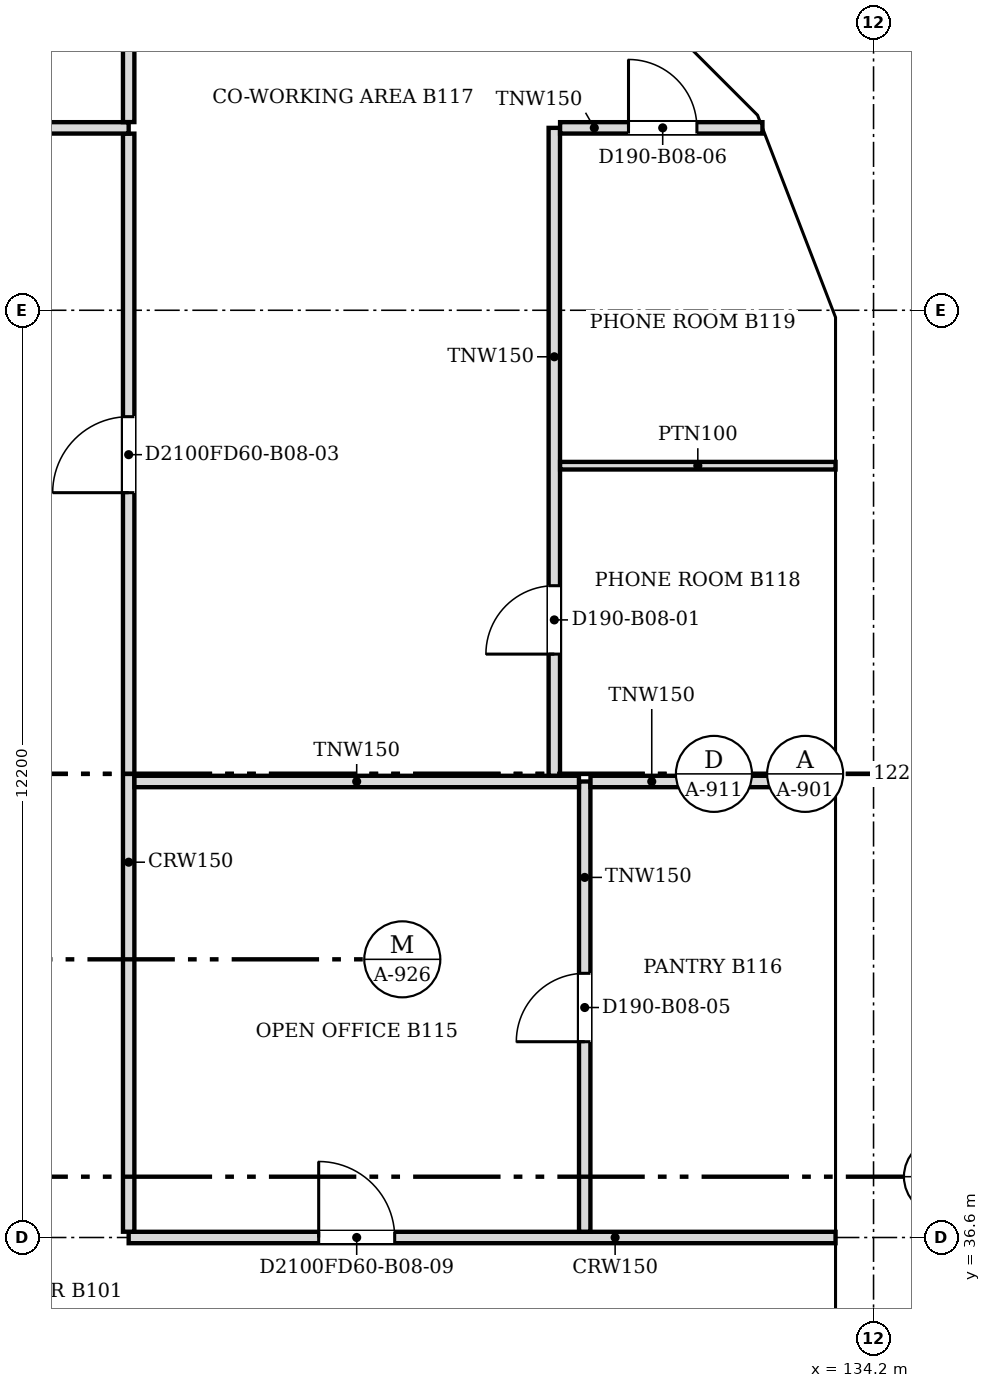
"""IFC4 building model, lengths in metres.
Left out: names, types, materials, properties, quantities, classifications, styles, units other than length and angle.
Written with IfcOpenShell. Run it as: python <this file> out.ifc"""

import sys

from ifc_helpers import new_model, si_unit, direction, frame, frame_2d, origin, place, context, subcontext, project, spatial, polyline, rectangle, outline, extrude, faceted_brep, source, transform, mapped, element, fill, save


model = new_model("IFC4")
c1 = context("Model", 3, precision=1e-05, world=origin(), true_north=direction((0.0, 1.0)))
c2 = subcontext(c1, "Body", "Model", "MODEL_VIEW")
j1 = project(units=[si_unit("LENGTHUNIT", "METRE"), si_unit("PLANEANGLEUNIT", "RADIAN")], contexts=[c1])
p1 = place(None, origin())
s1 = spatial("IfcSite", under=j1, at=p1, CompositionType="ELEMENT")
p2 = place(p1, origin())
s2 = spatial("IfcBuilding", under=s1, at=p2, CompositionType="ELEMENT")
p3 = place(p2, frame((0.0, 0.0, 80.0)))
s3 = spatial("IfcBuildingStorey", under=s2, at=p3, CompositionType="ELEMENT", Elevation=80.0)
m1 = source(origin(), c2, "Body", "Brep", [
    faceted_brep([(3.05, -0.25, 0.0), (6.1, -0.25, 3.8), (6.1, -0.25, 3.8), (3.05, -0.25, 7.6), (0.0, -0.25, 3.8), (0.0, 0.25, 3.8), (3.05, 0.25, 7.6), (6.1, 0.25, 3.8), (6.1, 0.25, 3.8), (3.05, 0.25, 0.0)], [[[0, 1, 2, 3, 4]], [[5, 6, 7, 8, 9]], [[9, 8, 1, 0]], [[7, 6, 3, 2]], [[6, 5, 4, 3]], [[5, 9, 0, 4]], [[1, 8, 7, 2]]]),
])
p4 = place(p3, frame((133.95, 33.55, -3.8), z_axis=(0.0, 0.0, 1.0), x_axis=(0.0, 1.0, 0.0)))
e1 = element("IfcWall", 1, at=p4, inside=s3, PredefinedType="SOLIDWALL", context=c2, shape_type="MappedRepresentation", body=[
    mapped(m1, transform((0.0, 0.0, 0.0), scale=1.0)),
])
m2 = source(origin(), c2, "Body", "SweptSolid", [
    extrude(outline(polyline([(3.05, 0.399), (5.78, 3.8), (3.05, 7.201), (0.321, 3.8), (3.05, 0.399)])), frame((0.0, 0.26, 0.0), z_axis=(0.0, -1.0, 0.0), x_axis=(1.0, 0.0, 0.0)), (0.0, 0.0, 1.0), 0.52),
])
p5 = place(p4, origin())
e2 = element("IfcOpeningElement", 2, at=p5, cuts=e1, PredefinedType="OPENING", context=c2, shape_type="MappedRepresentation", body=[
    mapped(m2, transform((0.0, 0.0, 0.0), scale=1.0)),
])
m3 = source(origin(), c2, "Body", "SweptSolid", [
    extrude(outline(polyline([(3.05, 0.0), (6.1, 3.8), (3.05, 7.6), (0.0, 3.8), (3.05, 0.0)])), frame((0.0, 0.25, 0.0), z_axis=(0.0, -1.0, 0.0), x_axis=(1.0, 0.0, 0.0)), (0.0, 0.0, 1.0), 0.5),
])
p6 = place(p3, frame((133.95, 39.65, -3.8), z_axis=(0.0, 0.0, 1.0), x_axis=(0.0, 1.0, 0.0)))
e3 = element("IfcWall", 3, at=p6, inside=s3, PredefinedType="SOLIDWALL", context=c2, shape_type="MappedRepresentation", body=[
    mapped(m3, transform((0.0, 0.0, 0.0), scale=1.0)),
])
p7 = place(p6, origin())
e4 = element("IfcOpeningElement", 4, at=p7, cuts=e3, PredefinedType="OPENING", context=c2, shape_type="MappedRepresentation", body=[
    mapped(m2, transform((0.0, 0.0, 0.0), scale=1.0)),
])
m4 = source(origin(), c2, "Body", "Brep", [
    faceted_brep([(3.003, -0.25, 0.0), (3.05, -0.25, 0.06), (3.05, -0.25, 7.54), (3.003, -0.25, 7.6), (0.0, -0.25, 3.8), (0.0, 0.25, 3.8), (2.957, 0.25, 7.541), (2.957, 0.25, 0.059), (3.003, 0.0, 0.0), (3.003, 0.0, 7.6)], [[[0, 1, 2, 3, 4]], [[5, 6, 7]], [[1, 0, 8]], [[9, 3, 2]], [[6, 5, 4, 3, 9]], [[5, 7, 8, 0, 4]], [[1, 8, 7, 6, 9, 2]]]),
])
p8 = place(p3, frame((133.95, 45.75, -3.8), z_axis=(0.0, 0.0, 1.0), x_axis=(0.0, 1.0, 0.0)))
e5 = element("IfcWall", 5, at=p8, inside=s3, PredefinedType="SOLIDWALL", context=c2, shape_type="MappedRepresentation", body=[
    mapped(m4, transform((0.0, 0.0, 0.0), scale=1.0)),
])
m5 = source(origin(), c2, "Body", "SweptSolid", [
    extrude(outline(polyline([(2.803, 6.944), (0.319, 3.8), (2.803, 0.656), (2.803, 6.944)])), frame((0.0, 0.26, 0.0), z_axis=(0.0, -1.0, 0.0), x_axis=(1.0, 0.0, 0.0)), (0.0, 0.0, 1.0), 0.52),
])
p9 = place(p8, origin())
e6 = element("IfcOpeningElement", 6, at=p9, cuts=e5, PredefinedType="OPENING", context=c2, shape_type="MappedRepresentation", body=[
    mapped(m5, transform((0.0, 0.0, 0.0), scale=1.0)),
])
m6 = source(origin(), c2, "Body", "Brep", [
    faceted_brep([(0.047, -0.25, 0.0), (2.997, -0.25, 3.8), (0.047, -0.25, 7.6), (0.0, -0.25, 7.541), (0.0, -0.25, 0.059), (0.093, 0.25, 7.54), (2.944, 0.25, 3.868), (2.944, 0.25, 3.732), (0.093, 0.25, 0.06), (2.997, 0.0, 3.8), (0.047, 0.0, 0.0), (0.047, 0.0, 7.6)], [[[0, 1, 2, 3, 4]], [[5, 6, 7, 8]], [[8, 7, 9, 1, 0, 10]], [[6, 5, 11, 2, 1, 9]], [[3, 2, 11]], [[10, 0, 4]], [[8, 10, 4, 3, 11, 5]], [[9, 7, 6]]]),
])
p10 = place(p3, frame((133.967, 48.71, -3.8), z_axis=(0.0, 0.0, 1.0), x_axis=(-0.359901446078, 0.932990326376, 0.0)))
e7 = element("IfcWall", 7, at=p10, inside=s3, PredefinedType="SOLIDWALL", context=c2, shape_type="MappedRepresentation", body=[
    mapped(m6, transform((0.0, 0.0, 0.0), scale=1.0)),
])
m7 = source(origin(), c2, "Body", "SweptSolid", [
    extrude(outline(polyline([(0.247, 0.665), (2.681, 3.8), (0.247, 6.935), (0.247, 0.665)])), frame((0.0, 0.26, 0.0), z_axis=(0.0, -1.0, 0.0), x_axis=(1.0, 0.0, 0.0)), (0.0, 0.0, 1.0), 0.52),
])
p11 = place(p10, origin())
e8 = element("IfcOpeningElement", 8, at=p11, cuts=e7, PredefinedType="OPENING", context=c2, shape_type="MappedRepresentation", body=[
    mapped(m7, transform((0.0, 0.0, 0.0), scale=1.0)),
])
m8 = source(origin(), c2, "Body", "Brep", [
    faceted_brep([(2.944, -0.25, 0.0), (2.997, -0.25, 0.068), (2.997, -0.25, 7.532), (2.944, -0.25, 7.6), (0.0, -0.25, 3.8), (0.053, 0.25, 3.868), (2.891, 0.25, 7.532), (2.891, 0.25, 0.068), (0.053, 0.25, 3.732), (2.944, 0.0, 0.0), (2.944, 0.0, 7.6), (0.0, 0.0, 3.8)], [[[0, 1, 2, 3, 4]], [[5, 6, 7, 8]], [[1, 0, 9]], [[10, 3, 2]], [[6, 5, 11, 4, 3, 10]], [[8, 7, 9, 0, 4, 11]], [[8, 11, 5]], [[1, 9, 7, 6, 10, 2]]]),
])
p12 = place(p3, frame((132.888, 51.506, -3.8), z_axis=(0.0, 0.0, 1.0), x_axis=(-0.707147509625, 0.707066050402, 0.0)))
e9 = element("IfcWall", 9, at=p12, inside=s3, PredefinedType="SOLIDWALL", context=c2, shape_type="MappedRepresentation", body=[
    mapped(m8, transform((0.0, 0.0, 0.0), scale=1.0)),
])
m9 = source(origin(), c2, "Body", "SweptSolid", [
    extrude(outline(polyline([(2.744, 6.934), (0.316, 3.8), (2.744, 0.666), (2.744, 6.934)])), frame((0.0, 0.26, 0.0), z_axis=(0.0, -1.0, 0.0), x_axis=(1.0, 0.0, 0.0)), (0.0, 0.0, 1.0), 0.52),
])
p13 = place(p12, origin())
e10 = element("IfcOpeningElement", 10, at=p13, cuts=e9, PredefinedType="OPENING", context=c2, shape_type="MappedRepresentation", body=[
    mapped(m9, transform((0.0, 0.0, 0.0), scale=1.0)),
])
p14 = place(p2, frame((0.0, 0.0, 83.8)))
s4 = spatial("IfcBuildingStorey", under=s2, at=p14, CompositionType="ELEMENT", Elevation=83.8)
p15 = place(p14, frame((133.95, 30.5, -3.8), z_axis=(0.0, 0.0, 1.0), x_axis=(0.0, 1.0, 0.0)))
e11 = element("IfcWall", 11, at=p15, inside=s4, PredefinedType="SOLIDWALL", context=c2, shape_type="MappedRepresentation", body=[
    mapped(m3, transform((0.0, 0.0, 0.0), scale=1.0)),
])
p16 = place(p15, origin())
e12 = element("IfcOpeningElement", 12, at=p16, cuts=e11, PredefinedType="OPENING", context=c2, shape_type="MappedRepresentation", body=[
    mapped(m2, transform((0.0, 0.0, 0.0), scale=1.0)),
])
p17 = place(p14, frame((133.95, 36.6, -3.8), z_axis=(0.0, 0.0, 1.0), x_axis=(0.0, 1.0, 0.0)))
e13 = element("IfcWall", 13, at=p17, inside=s4, PredefinedType="SOLIDWALL", context=c2, shape_type="MappedRepresentation", body=[
    mapped(m1, transform((0.0, 0.0, 0.0), scale=1.0)),
])
p18 = place(p17, origin())
e14 = element("IfcOpeningElement", 14, at=p18, cuts=e13, PredefinedType="OPENING", context=c2, shape_type="MappedRepresentation", body=[
    mapped(m2, transform((0.0, 0.0, 0.0), scale=1.0)),
])
m10 = source(origin(), c2, "Body", "Brep", [
    faceted_brep([(3.05, -0.25, 0.0), (6.053, -0.25, 3.8), (3.05, -0.25, 7.6), (0.0, -0.25, 3.8), (0.0, 0.25, 3.8), (3.05, 0.25, 7.6), (6.007, 0.25, 3.859), (6.007, 0.25, 3.741), (3.05, 0.25, 0.0), (6.053, 0.0, 3.8)], [[[0, 1, 2, 3]], [[4, 5, 6, 7, 8]], [[8, 7, 9, 1, 0]], [[6, 5, 2, 1, 9]], [[5, 4, 3, 2]], [[4, 8, 0, 3]], [[9, 7, 6]]]),
])
p19 = place(p14, frame((133.95, 42.7, -3.8), z_axis=(0.0, 0.0, 1.0), x_axis=(0.0, 1.0, 0.0)))
e15 = element("IfcWall", 15, at=p19, inside=s4, PredefinedType="SOLIDWALL", context=c2, shape_type="MappedRepresentation", body=[
    mapped(m10, transform((0.0, 0.0, 0.0), scale=1.0)),
])
m11 = source(origin(), c2, "Body", "SweptSolid", [
    extrude(outline(polyline([(3.049, 0.401), (5.735, 3.8), (3.049, 7.199), (0.321, 3.8), (3.049, 0.401)])), frame((0.0, 0.26, 0.0), z_axis=(0.0, -1.0, 0.0), x_axis=(1.0, 0.0, 0.0)), (0.0, 0.0, 1.0), 0.52),
])
p20 = place(p19, origin())
e16 = element("IfcOpeningElement", 16, at=p20, cuts=e15, PredefinedType="OPENING", context=c2, shape_type="MappedRepresentation", body=[
    mapped(m11, transform((0.0, 0.0, 0.0), scale=1.0)),
])
m12 = source(origin(), c2, "Body", "Brep", [
    faceted_brep([(2.95, -0.25, 0.0), (3.003, -0.25, 0.068), (3.003, -0.25, 7.532), (2.95, -0.25, 7.6), (0.0, -0.25, 3.8), (0.047, 0.25, 3.86), (2.898, 0.25, 7.532), (2.898, 0.25, 0.068), (0.047, 0.25, 3.74), (2.95, 0.0, 0.0), (2.95, 0.0, 7.6), (0.0, 0.0, 3.8)], [[[0, 1, 2, 3, 4]], [[5, 6, 7, 8]], [[1, 0, 9]], [[10, 3, 2]], [[6, 5, 11, 4, 3, 10]], [[8, 7, 9, 0, 4, 11]], [[8, 11, 5]], [[1, 9, 7, 6, 10, 2]]]),
])
p21 = place(p14, frame((133.95, 48.753, -3.8), z_axis=(0.0, 0.0, 1.0), x_axis=(-0.359855894603, 0.933007896601, 0.0)))
e17 = element("IfcWall", 17, at=p21, inside=s4, PredefinedType="SOLIDWALL", context=c2, shape_type="MappedRepresentation", body=[
    mapped(m12, transform((0.0, 0.0, 0.0), scale=1.0)),
])
m13 = source(origin(), c2, "Body", "SweptSolid", [
    extrude(outline(polyline([(2.75, 6.935), (0.316, 3.8), (2.75, 0.665), (2.75, 6.935)])), frame((0.0, 0.26, 0.0), z_axis=(0.0, -1.0, 0.0), x_axis=(1.0, 0.0, 0.0)), (0.0, 0.0, 1.0), 0.52),
])
p22 = place(p21, origin())
e18 = element("IfcOpeningElement", 18, at=p22, cuts=e17, PredefinedType="OPENING", context=c2, shape_type="MappedRepresentation", body=[
    mapped(m13, transform((0.0, 0.0, 0.0), scale=1.0)),
])
m14 = source(origin(), c2, "Body", "Brep", [
    faceted_brep([(0.053, -0.25, 0.0), (2.997, -0.25, 3.8), (0.053, -0.25, 7.6), (0.0, -0.25, 7.532), (0.0, -0.25, 0.068), (0.106, 0.25, 7.532), (2.944, 0.25, 3.868), (2.944, 0.25, 3.732), (0.106, 0.25, 0.068), (2.997, 0.0, 3.8), (0.053, 0.0, 0.0), (0.053, 0.0, 7.6)], [[[0, 1, 2, 3, 4]], [[5, 6, 7, 8]], [[8, 7, 9, 1, 0, 10]], [[6, 5, 11, 2, 1, 9]], [[3, 2, 11]], [[10, 0, 4]], [[8, 10, 4, 3, 11, 5]], [[9, 7, 6]]]),
])
p23 = place(p14, frame((132.926, 51.469, -3.8), z_axis=(0.0, 0.0, 1.0), x_axis=(-0.707066050402, 0.707147509625, 0.0)))
e19 = element("IfcWall", 19, at=p23, inside=s4, PredefinedType="SOLIDWALL", context=c2, shape_type="MappedRepresentation", body=[
    mapped(m14, transform((0.0, 0.0, 0.0), scale=1.0)),
])
m15 = source(origin(), c2, "Body", "SweptSolid", [
    extrude(outline(polyline([(0.253, 0.666), (2.681, 3.8), (0.253, 6.934), (0.253, 0.666)])), frame((0.0, 0.26, 0.0), z_axis=(0.0, -1.0, 0.0), x_axis=(1.0, 0.0, 0.0)), (0.0, 0.0, 1.0), 0.52),
])
p24 = place(p23, origin())
e20 = element("IfcOpeningElement", 20, at=p24, cuts=e19, PredefinedType="OPENING", context=c2, shape_type="MappedRepresentation", body=[
    mapped(m15, transform((0.0, 0.0, 0.0), scale=1.0)),
])
p25 = place(p3, frame((124.4, 36.6, 0.0), z_axis=(0.0, 0.0, 1.0), x_axis=(1.0, 0.0, 0.0)))
e21 = element("IfcWall", 21, at=p25, inside=s3, PredefinedType="PARTITIONING", context=c2, shape_type="SweptSolid", body=[
    extrude(rectangle(XDim=9.3, YDim=0.15, at=frame_2d((4.65, 0.0))), origin(), (0.0, 0.0, 1.0), 3.067),
])
m16 = source(origin(), c2, "Body", "SweptSolid", [
    extrude(rectangle(XDim=1.0, YDim=2.1, at=frame_2d((0.5, 1.05))), frame((0.0, 0.085, 0.0), z_axis=(0.0, -1.0, 0.0), x_axis=(1.0, 0.0, 0.0)), (0.0, 0.0, 1.0), 0.17),
])
p26 = place(p25, frame((2.5, 0.0, 0.0)))
e22 = element("IfcOpeningElement", 22, at=p26, cuts=e21, PredefinedType="OPENING", context=c2, shape_type="MappedRepresentation", body=[
    mapped(m16, transform((0.0, 0.0, 0.0), scale=1.0)),
])
p27 = place(p3, frame((124.4, 51.124, 0.0), z_axis=(0.0, 0.0, 1.0), x_axis=(0.0, -1.0, 0.0)))
e23 = element("IfcWall", 23, at=p27, inside=s3, PredefinedType="PARTITIONING", context=c2, shape_type="SweptSolid", body=[
    extrude(rectangle(XDim=14.448, YDim=0.15, at=frame_2d((7.224, 0.0))), origin(), (0.0, 0.0, 1.0), 3.067),
])
p28 = place(p27, frame((3.724, 0.0, 0.0)))
e24 = element("IfcOpeningElement", 24, at=p28, cuts=e23, PredefinedType="OPENING", context=c2, shape_type="MappedRepresentation", body=[
    mapped(m16, transform((0.0, 0.0, 0.0), scale=1.0)),
])
p29 = place(p3, frame((130.4, 42.6, 0.0), z_axis=(0.0, 0.0, 1.0), x_axis=(0.0, -1.0, 0.0)))
e25 = element("IfcWall", 25, at=p29, inside=s3, PredefinedType="PARTITIONING", context=c2, shape_type="SweptSolid", body=[
    extrude(rectangle(XDim=5.924, YDim=0.15, at=frame_2d((2.962, 0.0))), origin(), (0.0, 0.0, 1.0), 3.067),
])
m17 = source(origin(), c2, "Body", "SweptSolid", [
    extrude(rectangle(XDim=0.9, YDim=2.1, at=frame_2d((0.45, 1.05))), frame((0.0, 0.085, 0.0), z_axis=(0.0, -1.0, 0.0), x_axis=(1.0, 0.0, 0.0)), (0.0, 0.0, 1.0), 0.17),
])
p30 = place(p29, frame((2.524, 0.0, 0.0)))
e26 = element("IfcOpeningElement", 26, at=p30, cuts=e25, PredefinedType="OPENING", context=c2, shape_type="MappedRepresentation", body=[
    mapped(m17, transform((0.0, 0.0, 0.0), scale=1.0)),
])
p31 = place(p3, frame((124.476, 42.6, 0.0), z_axis=(0.0, 0.0, 1.0), x_axis=(1.0, 0.0, 0.0)))
e27 = element("IfcWall", 27, at=p31, inside=s3, PredefinedType="PARTITIONING", context=c2, shape_type="SweptSolid", body=[
    extrude(rectangle(XDim=5.848, YDim=0.15, at=frame_2d((2.924, 0.0))), origin(), (0.0, 0.0, 1.0), 3.067),
])
p32 = place(p3, frame((130.476, 42.6, 0.0), z_axis=(0.0, 0.0, 1.0), x_axis=(1.0, 0.0, 0.0)))
e28 = element("IfcWall", 28, at=p32, inside=s3, PredefinedType="PARTITIONING", context=c2, shape_type="SweptSolid", body=[
    extrude(rectangle(XDim=3.224, YDim=0.15, at=frame_2d((1.612, 0.0))), origin(), (0.0, 0.0, 1.0), 3.067),
])
p33 = place(p3, frame((130.0, 51.2, 0.0), z_axis=(0.0, 0.0, 1.0), x_axis=(0.0, -1.0, 0.0)))
e29 = element("IfcWall", 29, at=p33, inside=s3, PredefinedType="PARTITIONING", context=c2, shape_type="SweptSolid", body=[
    extrude(rectangle(XDim=8.524, YDim=0.15, at=frame_2d((4.262, 0.0))), origin(), (0.0, 0.0, 1.0), 3.067),
])
p34 = place(p33, frame((6.024, 0.0, 0.0)))
e30 = element("IfcOpeningElement", 30, at=p34, cuts=e29, PredefinedType="OPENING", context=c2, shape_type="MappedRepresentation", body=[
    mapped(m17, transform((0.0, 0.0, 0.0), scale=1.0)),
])
p35 = place(p3, frame((130.076, 46.755, 0.0), z_axis=(0.0, 0.0, 1.0), x_axis=(1.0, 0.0, 0.0)))
e31 = element("IfcWall", 31, at=p35, inside=s3, PredefinedType="PARTITIONING", context=c2, shape_type="SweptSolid", body=[
    extrude(rectangle(XDim=3.624, YDim=0.1, at=frame_2d((1.812, 0.0))), origin(), (0.0, 0.0, 1.0), 3.067),
])
p36 = place(p3, frame((108.5, 51.2, 0.0), z_axis=(0.0, 0.0, 1.0), x_axis=(1.0, 0.0, 0.0)))
e32 = element("IfcWall", 32, at=p36, inside=s3, PredefinedType="PARTITIONING", context=c2, shape_type="SweptSolid", body=[
    extrude(rectangle(XDim=15.9, YDim=0.15, at=frame_2d((7.95, 0.0))), origin(), (0.0, 0.0, 1.0), 3.067),
])
p37 = place(p36, frame((8.3, 0.0, 0.0)))
e33 = element("IfcOpeningElement", 33, at=p37, cuts=e32, PredefinedType="OPENING", context=c2, shape_type="MappedRepresentation", body=[
    mapped(m17, transform((0.0, 0.0, 0.0), scale=1.0)),
])
p38 = place(p3, frame((132.738, 51.2, 0.0), z_axis=(0.0, 0.0, 1.0), x_axis=(-1.0, 0.0, 0.0)))
e34 = element("IfcWall", 34, at=p38, inside=s3, PredefinedType="PARTITIONING", context=c2, shape_type="SweptSolid", body=[
    extrude(rectangle(XDim=2.662, YDim=0.15, at=frame_2d((1.331, 0.0))), origin(), (0.0, 0.0, 1.0), 3.067),
])
p39 = place(p38, frame((0.862, 0.0, 0.0)))
e35 = element("IfcOpeningElement", 35, at=p39, cuts=e34, PredefinedType="OPENING", context=c2, shape_type="MappedRepresentation", body=[
    mapped(m17, transform((0.0, 0.0, 0.0), scale=1.0)),
])
p40 = place(p3, frame((124.4, 51.276, 0.0), z_axis=(0.0, 0.0, 1.0), x_axis=(0.0, 1.0, 0.0)))
e36 = element("IfcWall", 36, at=p40, inside=s3, PredefinedType="PARTITIONING", context=c2, shape_type="SweptSolid", body=[
    extrude(rectangle(XDim=3.124, YDim=0.15, at=frame_2d((1.562, 0.0))), origin(), (0.0, 0.0, 1.0), 3.067),
])
m18 = source(origin(), c2, "Body", "SweptSolid", [
    extrude(rectangle(XDim=0.9, YDim=2.1, at=frame_2d((0.45, 1.05))), frame((0.0, 0.025, 0.0), z_axis=(0.0, -1.0, 0.0), x_axis=(1.0, 0.0, 0.0)), (0.0, 0.0, 1.0), 0.05),
])
p41 = place(p34, origin())
e37 = element("IfcDoor", 37, at=p41, inside=s3, OperationType="SINGLE_SWING_RIGHT", PredefinedType="DOOR", context=c2, shape_type="MappedRepresentation", body=[
    mapped(m18, transform((0.0, 0.0, 0.0), scale=1.0)),
])
fill(e30, e37)
p42 = place(p30, origin())
e38 = element("IfcDoor", 38, at=p42, inside=s3, OperationType="SINGLE_SWING_RIGHT", PredefinedType="DOOR", context=c2, shape_type="MappedRepresentation", body=[
    mapped(m18, transform((0.0, 0.0, 0.0), scale=1.0)),
])
fill(e26, e38)
p43 = place(p39, origin())
e39 = element("IfcDoor", 39, at=p43, inside=s3, OperationType="SINGLE_SWING_RIGHT", PredefinedType="DOOR", context=c2, shape_type="MappedRepresentation", body=[
    mapped(m18, transform((0.0, 0.0, 0.0), scale=1.0)),
])
fill(e35, e39)
m19 = source(origin(), c2, "Body", "SweptSolid", [
    extrude(rectangle(XDim=1.0, YDim=2.1, at=frame_2d((0.5, 1.05))), frame((0.0, 0.025, 0.0), z_axis=(0.0, -1.0, 0.0), x_axis=(1.0, 0.0, 0.0)), (0.0, 0.0, 1.0), 0.05),
])
p44 = place(p28, origin())
e40 = element("IfcDoor", 40, at=p44, inside=s3, OperationType="SINGLE_SWING_RIGHT", PredefinedType="DOOR", context=c2, shape_type="MappedRepresentation", body=[
    mapped(m19, transform((0.0, 0.0, 0.0), scale=1.0)),
])
fill(e24, e40)
p45 = place(p26, origin())
e41 = element("IfcDoor", 41, at=p45, inside=s3, OperationType="SINGLE_SWING_LEFT", PredefinedType="DOOR", context=c2, shape_type="MappedRepresentation", body=[
    mapped(m19, transform((0.0, 0.0, 0.0), scale=1.0)),
])
fill(e22, e41)
save(model, sys.argv[1])
